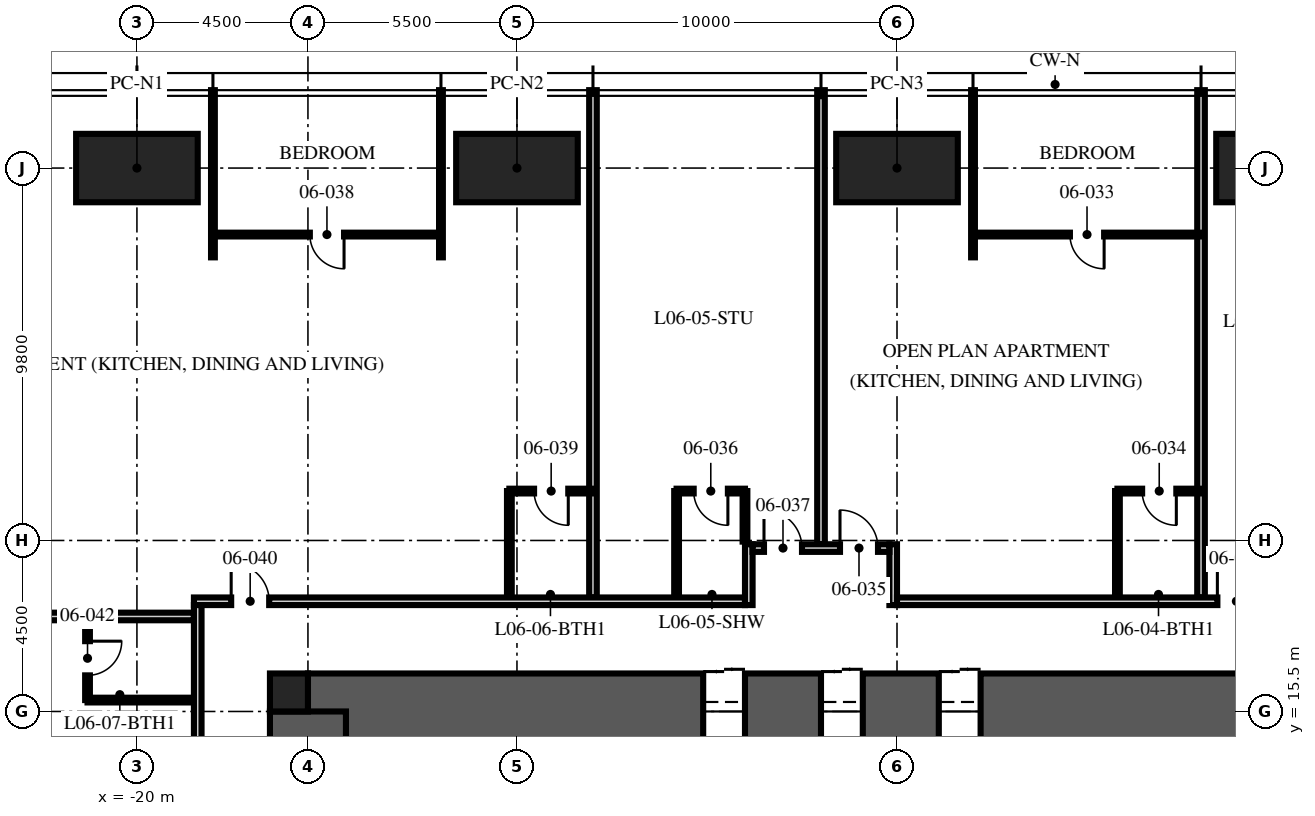
"""IFC4 building model, lengths in metres.
Left out: names, types, materials, properties, quantities, classifications, styles, units other than length and angle.
Written with IfcOpenShell. Run it as: python <this file> out.ifc"""

import sys

from ifc_helpers import new_model, si_unit, direction, frame, frame_2d, origin, origin_2d, place, context, subcontext, project, spatial, rectangle, hollow_rectangle, extrude, element, fill, save


model = new_model("IFC4")
c1 = context("Model", 3, precision=1e-05, world=origin(), true_north=direction((0.0, 1.0)))
c2 = subcontext(c1, "Body", "Model", "MODEL_VIEW")
j1 = project(units=[si_unit("LENGTHUNIT", "METRE"), si_unit("PLANEANGLEUNIT", "RADIAN")], contexts=[c1])
p1 = place(None, origin())
s1 = spatial("IfcSite", under=j1, at=p1, CompositionType="ELEMENT")
p2 = place(p1, origin())
s2 = spatial("IfcBuilding", under=s1, at=p2, CompositionType="ELEMENT")
p3 = place(p2, frame((0.0, 0.0, 28.5)))
s3 = spatial("IfcBuildingStorey", under=s2, at=p3, CompositionType="ELEMENT", Elevation=28.5)
p4 = place(p3, frame((-15.5, 15.5, -0.25), z_axis=(0.0, 0.0, 1.0), x_axis=(1.0, 0.0, 0.0)))
e1 = element("IfcWall", 1, at=p4, inside=s3, PredefinedType="SHEAR", context=c2, shape_type="SweptSolid", body=[
    extrude(rectangle(XDim=31.0, YDim=2.0, at=frame_2d((15.5, 0.0))), origin(), (0.0, 0.0, 1.0), 3.75),
])
p5 = place(p4, frame((10.4, 0.0, 0.25)))
e2 = element("IfcOpeningElement", 2, at=p5, cuts=e1, PredefinedType="OPENING", context=c2, shape_type="SweptSolid", body=[
    extrude(rectangle(XDim=1.1, YDim=2.1, at=frame_2d((0.55, 1.05))), frame((0.0, 1.01, 0.0), z_axis=(0.0, -1.0, 0.0), x_axis=(1.0, 0.0, 0.0)), (0.0, 0.0, 1.0), 2.02),
])
p6 = place(p4, frame((13.5, 0.0, 0.25)))
e3 = element("IfcOpeningElement", 3, at=p6, cuts=e1, PredefinedType="OPENING", context=c2, shape_type="SweptSolid", body=[
    extrude(rectangle(XDim=1.1, YDim=2.1, at=frame_2d((0.55, 1.05))), frame((0.0, 1.01, 0.0), z_axis=(0.0, -1.0, 0.0), x_axis=(1.0, 0.0, 0.0)), (0.0, 0.0, 1.0), 2.02),
])
p7 = place(p4, frame((16.6, 0.0, 0.25)))
e4 = element("IfcOpeningElement", 4, at=p7, cuts=e1, PredefinedType="OPENING", context=c2, shape_type="SweptSolid", body=[
    extrude(rectangle(XDim=1.1, YDim=2.1, at=frame_2d((0.55, 1.05))), frame((0.0, 1.01, 0.0), z_axis=(0.0, -1.0, 0.0), x_axis=(1.0, 0.0, 0.0)), (0.0, 0.0, 1.0), 2.02),
])
p8 = place(p3, frame((-15.5, -15.5, -0.25), z_axis=(0.0, 0.0, 1.0), x_axis=(0.0, 1.0, 0.0)))
e5 = element("IfcWall", 5, at=p8, inside=s3, PredefinedType="SHEAR", context=c2, shape_type="SweptSolid", body=[
    extrude(rectangle(XDim=31.0, YDim=2.0, at=frame_2d((15.5, 0.0))), origin(), (0.0, 0.0, 1.0), 3.75),
])
p9 = place(p8, frame((6.5, 0.0, 0.25)))
e6 = element("IfcOpeningElement", 6, at=p9, cuts=e5, PredefinedType="OPENING", context=c2, shape_type="SweptSolid", body=[
    extrude(rectangle(XDim=1.2, YDim=2.1, at=frame_2d((0.6, 1.05))), frame((0.0, 1.01, 0.0), z_axis=(0.0, -1.0, 0.0), x_axis=(1.0, 0.0, 0.0)), (0.0, 0.0, 1.0), 2.02),
])
p10 = place(p8, frame((23.0, 0.0, 0.25)))
e7 = element("IfcOpeningElement", 7, at=p10, cuts=e5, PredefinedType="OPENING", context=c2, shape_type="SweptSolid", body=[
    extrude(rectangle(XDim=1.8, YDim=2.1, at=frame_2d((0.9, 1.05))), frame((0.0, 1.01, 0.0), z_axis=(0.0, -1.0, 0.0), x_axis=(1.0, 0.0, 0.0)), (0.0, 0.0, 1.0), 2.02),
])
p11 = place(p3, frame((-16.0, 16.0, -0.25), z_axis=(0.0, 0.0, 1.0), x_axis=(1.0, 0.0, 0.0)))
e8 = element("IfcColumn", 8, at=p11, inside=s3, PredefinedType="COLUMN", context=c2, shape_type="SweptSolid", body=[
    extrude(rectangle(XDim=1.0, YDim=1.0, at=origin_2d()), origin(), (0.0, 0.0, 1.0), 3.75),
])
for number, where, z_axis, x_axis in (
    (9, (-20.0, 29.8, 0.0), (0.0, 0.0, 1.0), (1.0, 0.0, 0.0)),
    (10, (-10.0, 29.8, 0.0), (0.0, 0.0, 1.0), (1.0, 0.0, 0.0)),
    (11, (0.0, 29.8, 0.0), (0.0, 0.0, 1.0), (1.0, 0.0, 0.0)),
    (12, (10.0, 29.8, 0.0), (0.0, 0.0, 1.0), (1.0, 0.0, 0.0)),
):
    element("IfcColumn", number, at=place(p3, frame(where, z_axis=z_axis, x_axis=x_axis)), inside=s3, PredefinedType="COLUMN", context=c2, shape_type="SweptSolid", body=[
        extrude(hollow_rectangle(XDim=3.2, YDim=1.8, WallThickness=0.2, at=origin_2d()), origin(), (0.0, 0.0, 1.0), 3.75),
    ])
p12 = place(p3, frame((8.0, 18.5, 0.0), z_axis=(0.0, 0.0, 1.0), x_axis=(0.0, 1.0, 0.0)))
e13 = element("IfcWall", 13, at=p12, inside=s3, PredefinedType="PARTITIONING", context=c2, shape_type="SweptSolid", body=[
    extrude(rectangle(XDim=13.35, YDim=0.2, at=frame_2d((6.675, 0.0))), origin(), (0.0, 0.0, 1.0), 2.71),
])
p13 = place(p3, frame((2.0, 27.45, 0.0), z_axis=(0.0, 0.0, 1.0), x_axis=(0.0, 1.0, 0.0)))
e14 = element("IfcWall", 14, at=p13, inside=s3, PredefinedType="PARTITIONING", context=c2, shape_type="SweptSolid", body=[
    extrude(rectangle(XDim=4.4, YDim=0.1, at=frame_2d((2.2, 0.0))), origin(), (0.0, 0.0, 1.0), 2.71),
])
p14 = place(p3, frame((-2.0, 19.9, 0.0), z_axis=(0.0, 0.0, 1.0), x_axis=(0.0, 1.0, 0.0)))
e15 = element("IfcWall", 15, at=p14, inside=s3, PredefinedType="PARTITIONING", context=c2, shape_type="SweptSolid", body=[
    extrude(rectangle(XDim=11.95, YDim=0.2, at=frame_2d((5.975, 0.0))), origin(), (0.0, 0.0, 1.0), 2.71),
])
p15 = place(p3, frame((-8.0, 18.5, 0.0), z_axis=(0.0, 0.0, 1.0), x_axis=(0.0, 1.0, 0.0)))
e16 = element("IfcWall", 16, at=p15, inside=s3, PredefinedType="PARTITIONING", context=c2, shape_type="SweptSolid", body=[
    extrude(rectangle(XDim=13.35, YDim=0.2, at=frame_2d((6.675, 0.0))), origin(), (0.0, 0.0, 1.0), 2.71),
])
for number, where, z_axis, x_axis in (
    (17, (-12.0, 27.45, 0.0), (0.0, 0.0, 1.0), (0.0, 1.0, 0.0)),
    (18, (-18.0, 27.45, 0.0), (0.0, 0.0, 1.0), (0.0, 1.0, 0.0)),
):
    element("IfcWall", number, at=place(p3, frame(where, z_axis=z_axis, x_axis=x_axis)), inside=s3, PredefinedType="PARTITIONING", context=c2, shape_type="SweptSolid", body=[
        extrude(rectangle(XDim=4.4, YDim=0.1, at=frame_2d((2.2, 0.0))), origin(), (0.0, 0.0, 1.0), 2.71),
    ])
p16 = place(p3, frame((-18.5, 18.0, 0.0), z_axis=(0.0, 0.0, 1.0), x_axis=(-1.0, 0.0, 0.0)))
e19 = element("IfcWall", 19, at=p16, inside=s3, PredefinedType="PARTITIONING", context=c2, shape_type="SweptSolid", body=[
    extrude(rectangle(XDim=13.35, YDim=0.2, at=frame_2d((6.675, 0.0))), origin(), (0.0, 0.0, 1.0), 2.3),
])
p17 = place(p3, frame((8.0, 28.05, 0.0), z_axis=(0.0, 0.0, 1.0), x_axis=(-1.0, 0.0, 0.0)))
e20 = element("IfcWall", 20, at=p17, inside=s3, PredefinedType="PARTITIONING", context=c2, shape_type="SweptSolid", body=[
    extrude(rectangle(XDim=6.0, YDim=0.1, at=frame_2d((3.0, 0.0))), origin(), (0.0, 0.0, 1.0), 2.61),
])
p18 = place(p17, frame((2.55, 0.0, 0.0)))
e21 = element("IfcOpeningElement", 21, at=p18, cuts=e20, PredefinedType="OPENING", context=c2, shape_type="SweptSolid", body=[
    extrude(rectangle(XDim=0.9, YDim=2.1, at=frame_2d((0.45, 1.05))), frame((0.0, 0.06, 0.0), z_axis=(0.0, -1.0, 0.0), x_axis=(1.0, 0.0, 0.0)), (0.0, 0.0, 1.0), 0.12),
])
p19 = place(p3, frame((8.0, 21.3, 0.0), z_axis=(0.0, 0.0, 1.0), x_axis=(-1.0, 0.0, 0.0)))
e22 = element("IfcWall", 22, at=p19, inside=s3, PredefinedType="PARTITIONING", context=c2, shape_type="SweptSolid", body=[
    extrude(rectangle(XDim=2.2, YDim=0.125, at=frame_2d((1.1, 0.0))), origin(), (0.0, 0.0, 1.0), 3.5),
])
p20 = place(p19, frame((0.65, 0.0, 0.0)))
e23 = element("IfcOpeningElement", 23, at=p20, cuts=e22, PredefinedType="OPENING", context=c2, shape_type="SweptSolid", body=[
    extrude(rectangle(XDim=0.9, YDim=2.1, at=frame_2d((0.45, 1.05))), frame((0.0, 0.073, 0.0), z_axis=(0.0, -1.0, 0.0), x_axis=(1.0, 0.0, 0.0)), (0.0, 0.0, 1.0), 0.145),
])
p21 = place(p3, frame((5.8, 18.5, 0.0), z_axis=(0.0, 0.0, 1.0), x_axis=(0.0, 1.0, 0.0)))
e24 = element("IfcWall", 24, at=p21, inside=s3, PredefinedType="PARTITIONING", context=c2, shape_type="SweptSolid", body=[
    extrude(rectangle(XDim=2.8, YDim=0.125, at=frame_2d((1.4, 0.0))), origin(), (0.0, 0.0, 1.0), 3.5),
])
p22 = place(p3, frame((-4.0, 21.3, 0.0), z_axis=(0.0, 0.0, 1.0), x_axis=(-1.0, 0.0, 0.0)))
e25 = element("IfcWall", 25, at=p22, inside=s3, PredefinedType="PARTITIONING", context=c2, shape_type="SweptSolid", body=[
    extrude(rectangle(XDim=1.8, YDim=0.125, at=frame_2d((0.9, 0.0))), origin(), (0.0, 0.0, 1.0), 2.61),
])
p23 = place(p22, frame((0.45, 0.0, 0.0)))
e26 = element("IfcOpeningElement", 26, at=p23, cuts=e25, PredefinedType="OPENING", context=c2, shape_type="SweptSolid", body=[
    extrude(rectangle(XDim=0.9, YDim=2.1, at=frame_2d((0.45, 1.05))), frame((0.0, 0.073, 0.0), z_axis=(0.0, -1.0, 0.0), x_axis=(1.0, 0.0, 0.0)), (0.0, 0.0, 1.0), 0.145),
])
p24 = place(p3, frame((-4.0, 19.97, 0.0), z_axis=(0.0, 0.0, 1.0), x_axis=(0.0, 1.0, 0.0)))
e27 = element("IfcWall", 27, at=p24, inside=s3, PredefinedType="PARTITIONING", context=c2, shape_type="SweptSolid", body=[
    extrude(rectangle(XDim=1.33, YDim=0.125, at=frame_2d((0.665, 0.0))), origin(), (0.0, 0.0, 1.0), 3.5),
])
p25 = place(p3, frame((-5.8, 18.5, 0.0), z_axis=(0.0, 0.0, 1.0), x_axis=(0.0, 1.0, 0.0)))
e28 = element("IfcWall", 28, at=p25, inside=s3, PredefinedType="PARTITIONING", context=c2, shape_type="SweptSolid", body=[
    extrude(rectangle(XDim=2.8, YDim=0.125, at=frame_2d((1.4, 0.0))), origin(), (0.0, 0.0, 1.0), 3.5),
])
p26 = place(p3, frame((-12.0, 28.05, 0.0), z_axis=(0.0, 0.0, 1.0), x_axis=(-1.0, 0.0, 0.0)))
e29 = element("IfcWall", 29, at=p26, inside=s3, PredefinedType="PARTITIONING", context=c2, shape_type="SweptSolid", body=[
    extrude(rectangle(XDim=6.0, YDim=0.1, at=frame_2d((3.0, 0.0))), origin(), (0.0, 0.0, 1.0), 2.61),
])
p27 = place(p26, frame((2.55, 0.0, 0.0)))
e30 = element("IfcOpeningElement", 30, at=p27, cuts=e29, PredefinedType="OPENING", context=c2, shape_type="SweptSolid", body=[
    extrude(rectangle(XDim=0.9, YDim=2.1, at=frame_2d((0.45, 1.05))), frame((0.0, 0.06, 0.0), z_axis=(0.0, -1.0, 0.0), x_axis=(1.0, 0.0, 0.0)), (0.0, 0.0, 1.0), 0.12),
])
p28 = place(p3, frame((-8.0, 21.3, 0.0), z_axis=(0.0, 0.0, 1.0), x_axis=(-1.0, 0.0, 0.0)))
e31 = element("IfcWall", 31, at=p28, inside=s3, PredefinedType="PARTITIONING", context=c2, shape_type="SweptSolid", body=[
    extrude(rectangle(XDim=2.2, YDim=0.125, at=frame_2d((1.1, 0.0))), origin(), (0.0, 0.0, 1.0), 2.492),
])
p29 = place(p28, frame((0.65, 0.0, 0.0)))
e32 = element("IfcOpeningElement", 32, at=p29, cuts=e31, PredefinedType="OPENING", context=c2, shape_type="SweptSolid", body=[
    extrude(rectangle(XDim=0.9, YDim=2.1, at=frame_2d((0.45, 1.05))), frame((0.0, 0.073, 0.0), z_axis=(0.0, -1.0, 0.0), x_axis=(1.0, 0.0, 0.0)), (0.0, 0.0, 1.0), 0.145),
])
p30 = place(p3, frame((-10.2, 18.5, 0.0), z_axis=(0.0, 0.0, 1.0), x_axis=(0.0, 1.0, 0.0)))
e33 = element("IfcWall", 33, at=p30, inside=s3, PredefinedType="PARTITIONING", context=c2, shape_type="SweptSolid", body=[
    extrude(rectangle(XDim=2.8, YDim=0.125, at=frame_2d((1.4, 0.0))), origin(), (0.0, 0.0, 1.0), 2.492),
])
p31 = place(p3, frame((-21.3, 18.0, 0.0), z_axis=(0.0, 0.0, 1.0), x_axis=(0.0, -1.0, 0.0)))
e34 = element("IfcWall", 34, at=p31, inside=s3, PredefinedType="PARTITIONING", context=c2, shape_type="SweptSolid", body=[
    extrude(rectangle(XDim=2.2, YDim=0.125, at=frame_2d((1.1, 0.0))), origin(), (0.0, 0.0, 1.0), 3.5),
])
p32 = place(p31, frame((0.65, 0.0, 0.0)))
e35 = element("IfcOpeningElement", 35, at=p32, cuts=e34, PredefinedType="OPENING", context=c2, shape_type="SweptSolid", body=[
    extrude(rectangle(XDim=0.9, YDim=2.1, at=frame_2d((0.45, 1.05))), frame((0.0, 0.073, 0.0), z_axis=(0.0, -1.0, 0.0), x_axis=(1.0, 0.0, 0.0)), (0.0, 0.0, 1.0), 0.145),
])
p33 = place(p3, frame((-18.5, 15.8, 0.0), z_axis=(0.0, 0.0, 1.0), x_axis=(-1.0, 0.0, 0.0)))
e36 = element("IfcWall", 36, at=p33, inside=s3, PredefinedType="PARTITIONING", context=c2, shape_type="SweptSolid", body=[
    extrude(rectangle(XDim=2.8, YDim=0.125, at=frame_2d((1.4, 0.0))), origin(), (0.0, 0.0, 1.0), 3.5),
])
p34 = place(p3, frame((-18.5, 18.4, 0.0), z_axis=(0.0, 0.0, 1.0), x_axis=(1.0, 0.0, 0.0)))
e37 = element("IfcWall", 37, at=p34, inside=s3, PredefinedType="PARTITIONING", context=c2, shape_type="SweptSolid", body=[
    extrude(rectangle(XDim=14.5, YDim=0.2, at=frame_2d((7.25, 0.0))), origin(), (0.0, 0.0, 1.0), 2.3),
])
p35 = place(p34, frame((0.98, 0.0, 0.0)))
e38 = element("IfcOpeningElement", 38, at=p35, cuts=e37, PredefinedType="OPENING", context=c2, shape_type="SweptSolid", body=[
    extrude(rectangle(XDim=1.0, YDim=2.2, at=frame_2d((0.5, 1.1))), frame((0.0, 0.11, 0.0), z_axis=(0.0, -1.0, 0.0), x_axis=(1.0, 0.0, 0.0)), (0.0, 0.0, 1.0), 0.22),
])
p36 = place(p3, frame((-3.9, 18.3, 0.0), z_axis=(0.0, 0.0, 1.0), x_axis=(0.0, 1.0, 0.0)))
e39 = element("IfcWall", 39, at=p36, inside=s3, PredefinedType="PARTITIONING", context=c2, shape_type="SweptSolid", body=[
    extrude(rectangle(XDim=1.6, YDim=0.2, at=frame_2d((0.8, 0.0))), origin(), (0.0, 0.0, 1.0), 3.5),
])
p37 = place(p3, frame((-0.1, 18.3, 0.0), z_axis=(0.0, 0.0, 1.0), x_axis=(0.0, 1.0, 0.0)))
e40 = element("IfcWall", 40, at=p37, inside=s3, PredefinedType="PARTITIONING", context=c2, shape_type="SweptSolid", body=[
    extrude(rectangle(XDim=1.6, YDim=0.2, at=frame_2d((0.8, 0.0))), origin(), (0.0, 0.0, 1.0), 2.492),
])
p38 = place(p3, frame((-3.8, 19.8, 0.0), z_axis=(0.0, 0.0, 1.0), x_axis=(1.0, 0.0, 0.0)))
e41 = element("IfcWall", 41, at=p38, inside=s3, PredefinedType="PARTITIONING", context=c2, shape_type="SweptSolid", body=[
    extrude(rectangle(XDim=3.6, YDim=0.2, at=frame_2d((1.8, 0.0))), origin(), (0.0, 0.0, 1.0), 3.5),
])
p39 = place(p38, frame((2.3, 0.0, 0.0)))
e42 = element("IfcOpeningElement", 42, at=p39, cuts=e41, PredefinedType="OPENING", context=c2, shape_type="SweptSolid", body=[
    extrude(rectangle(XDim=1.0, YDim=2.2, at=frame_2d((0.5, 1.1))), frame((0.0, 0.11, 0.0), z_axis=(0.0, -1.0, 0.0), x_axis=(1.0, 0.0, 0.0)), (0.0, 0.0, 1.0), 0.22),
])
p40 = place(p38, frame((0.3, 0.0, 0.0)))
e43 = element("IfcOpeningElement", 43, at=p40, cuts=e41, PredefinedType="OPENING", context=c2, shape_type="SweptSolid", body=[
    extrude(rectangle(XDim=1.0, YDim=2.2, at=frame_2d((0.5, 1.1))), frame((0.0, 0.11, 0.0), z_axis=(0.0, -1.0, 0.0), x_axis=(1.0, 0.0, 0.0)), (0.0, 0.0, 1.0), 0.22),
])
p41 = place(p3, frame((0.0, 18.4, 0.0), z_axis=(0.0, 0.0, 1.0), x_axis=(1.0, 0.0, 0.0)))
e44 = element("IfcWall", 44, at=p41, inside=s3, PredefinedType="PARTITIONING", context=c2, shape_type="SweptSolid", body=[
    extrude(rectangle(XDim=18.5, YDim=0.2, at=frame_2d((9.25, 0.0))), origin(), (0.0, 0.0, 1.0), 2.3),
])
p42 = place(p41, frame((8.43, 0.0, 0.0)))
e45 = element("IfcOpeningElement", 45, at=p42, cuts=e44, PredefinedType="OPENING", context=c2, shape_type="SweptSolid", body=[
    extrude(rectangle(XDim=1.0, YDim=2.2, at=frame_2d((0.5, 1.1))), frame((0.0, 0.11, 0.0), z_axis=(0.0, -1.0, 0.0), x_axis=(1.0, 0.0, 0.0)), (0.0, 0.0, 1.0), 0.22),
])
p43 = place(p3, frame((-18.4, 18.3, 0.0), z_axis=(0.0, 0.0, 1.0), x_axis=(0.0, -1.0, 0.0)))
e46 = element("IfcWall", 46, at=p43, inside=s3, PredefinedType="PARTITIONING", context=c2, shape_type="SweptSolid", body=[
    extrude(rectangle(XDim=8.3, YDim=0.2, at=frame_2d((4.15, 0.0))), origin(), (0.0, 0.0, 1.0), 2.3),
])
p44 = place(p5, origin())
e47 = element("IfcDoor", 47, at=p44, inside=s3, OperationType="DOUBLE_DOOR_SLIDING", PredefinedType="DOOR", context=c2, shape_type="SweptSolid", body=[
    extrude(rectangle(XDim=1.1, YDim=2.1, at=frame_2d((0.55, 1.05))), frame((0.0, 0.025, 0.0), z_axis=(0.0, -1.0, 0.0), x_axis=(1.0, 0.0, 0.0)), (0.0, 0.0, 1.0), 0.05),
])
fill(e2, e47)
p45 = place(p6, origin())
e48 = element("IfcDoor", 48, at=p45, inside=s3, OperationType="DOUBLE_DOOR_SLIDING", PredefinedType="DOOR", context=c2, shape_type="SweptSolid", body=[
    extrude(rectangle(XDim=1.1, YDim=2.1, at=frame_2d((0.55, 1.05))), frame((0.0, 0.025, 0.0), z_axis=(0.0, -1.0, 0.0), x_axis=(1.0, 0.0, 0.0)), (0.0, 0.0, 1.0), 0.05),
])
fill(e3, e48)
p46 = place(p7, origin())
e49 = element("IfcDoor", 49, at=p46, inside=s3, OperationType="DOUBLE_DOOR_SLIDING", PredefinedType="DOOR", context=c2, shape_type="SweptSolid", body=[
    extrude(rectangle(XDim=1.1, YDim=2.1, at=frame_2d((0.55, 1.05))), frame((0.0, 0.025, 0.0), z_axis=(0.0, -1.0, 0.0), x_axis=(1.0, 0.0, 0.0)), (0.0, 0.0, 1.0), 0.05),
])
fill(e4, e49)
p47 = place(p42, origin())
e50 = element("IfcDoor", 50, at=p47, inside=s3, OperationType="SINGLE_SWING_LEFT", PredefinedType="DOOR", context=c2, shape_type="SweptSolid", body=[
    extrude(rectangle(XDim=1.0, YDim=2.2, at=frame_2d((0.5, 1.1))), frame((0.0, 0.025, 0.0), z_axis=(0.0, -1.0, 0.0), x_axis=(1.0, 0.0, 0.0)), (0.0, 0.0, 1.0), 0.05),
])
fill(e45, e50)
p48 = place(p18, origin())
e51 = element("IfcDoor", 51, at=p48, inside=s3, OperationType="SINGLE_SWING_LEFT", PredefinedType="DOOR", context=c2, shape_type="SweptSolid", body=[
    extrude(rectangle(XDim=0.9, YDim=2.1, at=frame_2d((0.45, 1.05))), frame((0.0, 0.025, 0.0), z_axis=(0.0, -1.0, 0.0), x_axis=(1.0, 0.0, 0.0)), (0.0, 0.0, 1.0), 0.05),
])
fill(e21, e51)
p49 = place(p20, origin())
e52 = element("IfcDoor", 52, at=p49, inside=s3, OperationType="SINGLE_SWING_LEFT", PredefinedType="DOOR", context=c2, shape_type="SweptSolid", body=[
    extrude(rectangle(XDim=0.9, YDim=2.1, at=frame_2d((0.45, 1.05))), frame((0.0, 0.025, 0.0), z_axis=(0.0, -1.0, 0.0), x_axis=(1.0, 0.0, 0.0)), (0.0, 0.0, 1.0), 0.05),
])
fill(e23, e52)
p50 = place(p39, origin())
e53 = element("IfcDoor", 53, at=p50, inside=s3, OperationType="SINGLE_SWING_LEFT", PredefinedType="DOOR", context=c2, shape_type="SweptSolid", body=[
    extrude(rectangle(XDim=1.0, YDim=2.2, at=frame_2d((0.5, 1.1))), frame((0.0, 0.025, 0.0), z_axis=(0.0, -1.0, 0.0), x_axis=(1.0, 0.0, 0.0)), (0.0, 0.0, 1.0), 0.05),
])
fill(e42, e53)
p51 = place(p23, origin())
e54 = element("IfcDoor", 54, at=p51, inside=s3, OperationType="SINGLE_SWING_LEFT", PredefinedType="DOOR", context=c2, shape_type="SweptSolid", body=[
    extrude(rectangle(XDim=0.9, YDim=2.1, at=frame_2d((0.45, 1.05))), frame((0.0, 0.025, 0.0), z_axis=(0.0, -1.0, 0.0), x_axis=(1.0, 0.0, 0.0)), (0.0, 0.0, 1.0), 0.05),
])
fill(e26, e54)
p52 = place(p40, origin())
e55 = element("IfcDoor", 55, at=p52, inside=s3, OperationType="SINGLE_SWING_LEFT", PredefinedType="DOOR", context=c2, shape_type="SweptSolid", body=[
    extrude(rectangle(XDim=1.0, YDim=2.2, at=frame_2d((0.5, 1.1))), frame((0.0, 0.025, 0.0), z_axis=(0.0, -1.0, 0.0), x_axis=(1.0, 0.0, 0.0)), (0.0, 0.0, 1.0), 0.05),
])
fill(e43, e55)
p53 = place(p27, origin())
e56 = element("IfcDoor", 56, at=p53, inside=s3, OperationType="SINGLE_SWING_LEFT", PredefinedType="DOOR", context=c2, shape_type="SweptSolid", body=[
    extrude(rectangle(XDim=0.9, YDim=2.1, at=frame_2d((0.45, 1.05))), frame((0.0, 0.025, 0.0), z_axis=(0.0, -1.0, 0.0), x_axis=(1.0, 0.0, 0.0)), (0.0, 0.0, 1.0), 0.05),
])
fill(e30, e56)
p54 = place(p29, origin())
e57 = element("IfcDoor", 57, at=p54, inside=s3, OperationType="SINGLE_SWING_LEFT", PredefinedType="DOOR", context=c2, shape_type="SweptSolid", body=[
    extrude(rectangle(XDim=0.9, YDim=2.1, at=frame_2d((0.45, 1.05))), frame((0.0, 0.025, 0.0), z_axis=(0.0, -1.0, 0.0), x_axis=(1.0, 0.0, 0.0)), (0.0, 0.0, 1.0), 0.05),
])
fill(e32, e57)
p55 = place(p35, origin())
e58 = element("IfcDoor", 58, at=p55, inside=s3, OperationType="SINGLE_SWING_LEFT", PredefinedType="DOOR", context=c2, shape_type="SweptSolid", body=[
    extrude(rectangle(XDim=1.0, YDim=2.2, at=frame_2d((0.5, 1.1))), frame((0.0, 0.025, 0.0), z_axis=(0.0, -1.0, 0.0), x_axis=(1.0, 0.0, 0.0)), (0.0, 0.0, 1.0), 0.05),
])
fill(e38, e58)
p56 = place(p32, origin())
e59 = element("IfcDoor", 59, at=p56, inside=s3, OperationType="SINGLE_SWING_LEFT", PredefinedType="DOOR", context=c2, shape_type="SweptSolid", body=[
    extrude(rectangle(XDim=0.9, YDim=2.1, at=frame_2d((0.45, 1.05))), frame((0.0, 0.025, 0.0), z_axis=(0.0, -1.0, 0.0), x_axis=(1.0, 0.0, 0.0)), (0.0, 0.0, 1.0), 0.05),
])
fill(e35, e59)
save(model, sys.argv[1])
